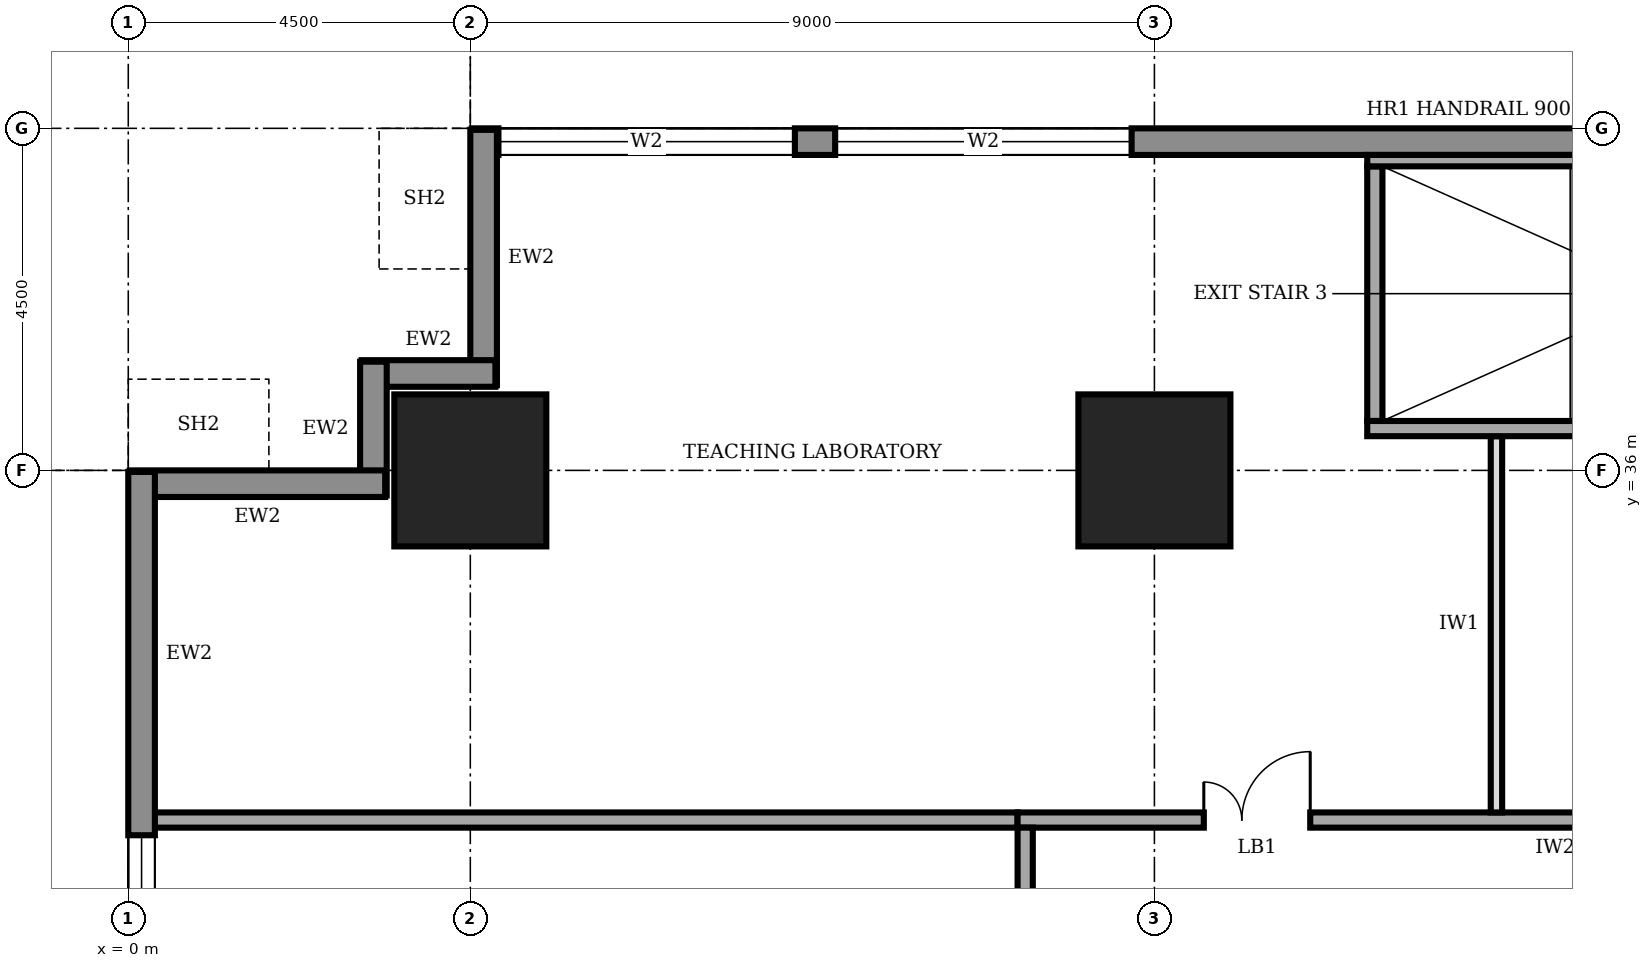
"""IFC4 building model, lengths in metres.
Left out: names, types, materials, properties, quantities, classifications, styles, units other than length and angle.
Written with IfcOpenShell. Run it as: python <this file> out.ifc"""

import sys

from ifc_helpers import new_model, si_unit, direction, frame, frame_2d, origin, origin_2d, place, context, subcontext, project, spatial, rectangle, extrude, element, fill, save


model = new_model("IFC4")
c1 = context("Model", 3, precision=1e-05, world=origin(), true_north=direction((0.0, 1.0)))
c2 = subcontext(c1, "Body", "Model", "MODEL_VIEW")
j1 = project(units=[si_unit("LENGTHUNIT", "METRE"), si_unit("PLANEANGLEUNIT", "RADIAN")], contexts=[c1])
p1 = place(None, origin())
s1 = spatial("IfcSite", under=j1, at=p1, CompositionType="ELEMENT")
p2 = place(p1, origin())
s2 = spatial("IfcBuilding", under=s1, at=p2, CompositionType="ELEMENT")
p3 = place(p2, frame((0.0, 0.0, 65.0)))
s3 = spatial("IfcBuildingStorey", under=s2, at=p3, CompositionType="ELEMENT", Elevation=65.0)
for number, where, z_axis, x_axis in (
    (1, (4.5, 36.0, 0.0), (0.0, 0.0, 1.0), (1.0, 0.0, 0.0)),
    (2, (13.5, 36.0, 0.0), (0.0, 0.0, 1.0), (1.0, 0.0, 0.0)),
):
    element("IfcColumn", number, at=place(p3, frame(where, z_axis=z_axis, x_axis=x_axis)), inside=s3, PredefinedType="COLUMN", context=c2, shape_type="SweptSolid", body=[
        extrude(rectangle(XDim=2.0, YDim=2.0, at=origin_2d()), origin(), (0.0, 0.0, 1.0), 4.0),
    ])
p4 = place(p3, frame((35.98, 40.325, 0.0), z_axis=(0.0, 0.0, 1.0), x_axis=(-1.0, 0.0, 0.0)))
e3 = element("IfcWall", 3, at=p4, inside=s3, PredefinedType="STANDARD", context=c2, shape_type="SweptSolid", body=[
    extrude(rectangle(XDim=31.46, YDim=0.35, at=frame_2d((15.73, 0.0))), origin(), (0.0, 0.0, 1.0), 3.75),
])
p5 = place(p4, frame((27.21, 0.0, 0.6)))
e4 = element("IfcOpeningElement", 4, at=p5, cuts=e3, PredefinedType="OPENING", context=c2, shape_type="SweptSolid", body=[
    extrude(rectangle(XDim=3.9, YDim=2.6, at=frame_2d((1.95, 1.3))), frame((0.0, 0.185, 0.0), z_axis=(0.0, -1.0, 0.0), x_axis=(1.0, 0.0, 0.0)), (0.0, 0.0, 1.0), 0.37),
])
p6 = place(p4, frame((22.78, 0.0, 0.6)))
e5 = element("IfcOpeningElement", 5, at=p6, cuts=e3, PredefinedType="OPENING", context=c2, shape_type="SweptSolid", body=[
    extrude(rectangle(XDim=3.9, YDim=2.6, at=frame_2d((1.95, 1.3))), frame((0.0, 0.185, 0.0), z_axis=(0.0, -1.0, 0.0), x_axis=(1.0, 0.0, 0.0)), (0.0, 0.0, 1.0), 0.37),
])
p7 = place(p4, frame((4.78, 0.0, 0.6)))
e6 = element("IfcOpeningElement", 6, at=p7, cuts=e3, PredefinedType="OPENING", context=c2, shape_type="SweptSolid", body=[
    extrude(rectangle(XDim=3.9, YDim=2.6, at=frame_2d((1.95, 1.3))), frame((0.0, 0.185, 0.0), z_axis=(0.0, -1.0, 0.0), x_axis=(1.0, 0.0, 0.0)), (0.0, 0.0, 1.0), 0.37),
])
p8 = place(p3, frame((4.675, 40.48, 0.0), z_axis=(0.0, 0.0, 1.0), x_axis=(0.0, -1.0, 0.0)))
e7 = element("IfcWall", 7, at=p8, inside=s3, PredefinedType="STANDARD", context=c2, shape_type="SweptSolid", body=[
    extrude(rectangle(XDim=3.36, YDim=0.35, at=frame_2d((1.68, 0.0))), origin(), (0.0, 0.0, 1.0), 2.85),
])
for number, where, z_axis, x_axis in (
    (8, (4.83, 37.275, 0.0), (0.0, 0.0, 1.0), (-1.0, 0.0, 0.0)),
    (9, (3.225, 37.43, 0.0), (0.0, 0.0, 1.0), (0.0, -1.0, 0.0)),
):
    element("IfcWall", number, at=place(p3, frame(where, z_axis=z_axis, x_axis=x_axis)), inside=s3, PredefinedType="STANDARD", context=c2, shape_type="SweptSolid", body=[
        extrude(rectangle(XDim=1.76, YDim=0.35, at=frame_2d((0.88, 0.0))), origin(), (0.0, 0.0, 1.0), 3.75),
    ])
p9 = place(p3, frame((3.38, 35.825, 0.0), z_axis=(0.0, 0.0, 1.0), x_axis=(-1.0, 0.0, 0.0)))
e10 = element("IfcWall", 10, at=p9, inside=s3, PredefinedType="STANDARD", context=c2, shape_type="SweptSolid", body=[
    extrude(rectangle(XDim=3.36, YDim=0.35, at=frame_2d((1.68, 0.0))), origin(), (0.0, 0.0, 1.0), 2.85),
])
p10 = place(p3, frame((0.175, 35.98, 0.0), z_axis=(0.0, 0.0, 1.0), x_axis=(0.0, -1.0, 0.0)))
e11 = element("IfcWall", 11, at=p10, inside=s3, PredefinedType="STANDARD", context=c2, shape_type="SweptSolid", body=[
    extrude(rectangle(XDim=31.46, YDim=0.35, at=frame_2d((15.73, 0.0))), origin(), (0.0, 0.0, 1.0), 3.75),
])
p11 = place(p10, frame((27.21, 0.0, 0.6)))
e12 = element("IfcOpeningElement", 12, at=p11, cuts=e11, PredefinedType="OPENING", context=c2, shape_type="SweptSolid", body=[
    extrude(rectangle(XDim=3.9, YDim=2.6, at=frame_2d((1.95, 1.3))), frame((0.0, 0.185, 0.0), z_axis=(0.0, -1.0, 0.0), x_axis=(1.0, 0.0, 0.0)), (0.0, 0.0, 1.0), 0.37),
])
p12 = place(p10, frame((22.78, 0.0, 0.6)))
e13 = element("IfcOpeningElement", 13, at=p12, cuts=e11, PredefinedType="OPENING", context=c2, shape_type="SweptSolid", body=[
    extrude(rectangle(XDim=3.9, YDim=2.6, at=frame_2d((1.95, 1.3))), frame((0.0, 0.185, 0.0), z_axis=(0.0, -1.0, 0.0), x_axis=(1.0, 0.0, 0.0)), (0.0, 0.0, 1.0), 0.37),
])
p13 = place(p10, frame((18.28, 0.0, 0.6)))
e14 = element("IfcOpeningElement", 14, at=p13, cuts=e11, PredefinedType="OPENING", context=c2, shape_type="SweptSolid", body=[
    extrude(rectangle(XDim=3.9, YDim=2.6, at=frame_2d((1.95, 1.3))), frame((0.0, 0.185, 0.0), z_axis=(0.0, -1.0, 0.0), x_axis=(1.0, 0.0, 0.0)), (0.0, 0.0, 1.0), 0.37),
])
p14 = place(p10, frame((13.78, 0.0, 0.6)))
e15 = element("IfcOpeningElement", 15, at=p14, cuts=e11, PredefinedType="OPENING", context=c2, shape_type="SweptSolid", body=[
    extrude(rectangle(XDim=3.9, YDim=2.6, at=frame_2d((1.95, 1.3))), frame((0.0, 0.185, 0.0), z_axis=(0.0, -1.0, 0.0), x_axis=(1.0, 0.0, 0.0)), (0.0, 0.0, 1.0), 0.37),
])
p15 = place(p10, frame((9.28, 0.0, 0.6)))
e16 = element("IfcOpeningElement", 16, at=p15, cuts=e11, PredefinedType="OPENING", context=c2, shape_type="SweptSolid", body=[
    extrude(rectangle(XDim=3.9, YDim=2.6, at=frame_2d((1.95, 1.3))), frame((0.0, 0.185, 0.0), z_axis=(0.0, -1.0, 0.0), x_axis=(1.0, 0.0, 0.0)), (0.0, 0.0, 1.0), 0.37),
])
p16 = place(p10, frame((4.78, 0.0, 0.6)))
e17 = element("IfcOpeningElement", 17, at=p16, cuts=e11, PredefinedType="OPENING", context=c2, shape_type="SweptSolid", body=[
    extrude(rectangle(XDim=3.9, YDim=2.6, at=frame_2d((1.95, 1.3))), frame((0.0, 0.185, 0.0), z_axis=(0.0, -1.0, 0.0), x_axis=(1.0, 0.0, 0.0)), (0.0, 0.0, 1.0), 0.37),
])
p17 = place(p3, frame((30.1, 31.4, 0.0), z_axis=(0.0, 0.0, 1.0), x_axis=(-1.0, 0.0, 0.0)))
e18 = element("IfcWall", 18, at=p17, inside=s3, PredefinedType="SOLIDWALL", context=c2, shape_type="SweptSolid", body=[
    extrude(rectangle(XDim=18.4, YDim=0.2, at=frame_2d((9.2, 0.0))), origin(), (0.0, 0.0, 1.0), 3.75),
])
p18 = place(p17, frame((14.55, 0.0, 0.0)))
e19 = element("IfcOpeningElement", 19, at=p18, cuts=e18, PredefinedType="OPENING", context=c2, shape_type="SweptSolid", body=[
    extrude(rectangle(XDim=1.4, YDim=2.1, at=frame_2d((0.7, 1.05))), frame((0.0, 0.11, 0.0), z_axis=(0.0, -1.0, 0.0), x_axis=(1.0, 0.0, 0.0)), (0.0, 0.0, 1.0), 0.22),
])
p19 = place(p17, frame((7.1, 0.0, 0.0)))
e20 = element("IfcOpeningElement", 20, at=p19, cuts=e18, PredefinedType="OPENING", context=c2, shape_type="SweptSolid", body=[
    extrude(rectangle(XDim=1.0, YDim=2.1, at=frame_2d((0.5, 1.05))), frame((0.0, 0.11, 0.0), z_axis=(0.0, -1.0, 0.0), x_axis=(1.0, 0.0, 0.0)), (0.0, 0.0, 1.0), 0.22),
])
p20 = place(p17, frame((0.55, 0.0, 0.0)))
e21 = element("IfcOpeningElement", 21, at=p20, cuts=e18, PredefinedType="OPENING", context=c2, shape_type="SweptSolid", body=[
    extrude(rectangle(XDim=1.8, YDim=2.1, at=frame_2d((0.9, 1.05))), frame((0.0, 0.11, 0.0), z_axis=(0.0, -1.0, 0.0), x_axis=(1.0, 0.0, 0.0)), (0.0, 0.0, 1.0), 0.22),
])
p21 = place(p3, frame((11.8, 31.3, 0.0), z_axis=(0.0, 0.0, 1.0), x_axis=(0.0, -1.0, 0.0)))
e22 = element("IfcWall", 22, at=p21, inside=s3, PredefinedType="SOLIDWALL", context=c2, shape_type="SweptSolid", body=[
    extrude(rectangle(XDim=22.3, YDim=0.2, at=frame_2d((11.15, 0.0))), origin(), (0.0, 0.0, 1.0), 3.75),
])
p22 = place(p21, frame((19.55, 0.0, 0.0)))
e23 = element("IfcOpeningElement", 23, at=p22, cuts=e22, PredefinedType="OPENING", context=c2, shape_type="SweptSolid", body=[
    extrude(rectangle(XDim=1.0, YDim=2.1, at=frame_2d((0.5, 1.05))), frame((0.0, 0.11, 0.0), z_axis=(0.0, -1.0, 0.0), x_axis=(1.0, 0.0, 0.0)), (0.0, 0.0, 1.0), 0.22),
])
p23 = place(p21, frame((15.45, 0.0, 0.0)))
e24 = element("IfcOpeningElement", 24, at=p23, cuts=e22, PredefinedType="OPENING", context=c2, shape_type="SweptSolid", body=[
    extrude(rectangle(XDim=0.9, YDim=2.1, at=frame_2d((0.45, 1.05))), frame((0.0, 0.11, 0.0), z_axis=(0.0, -1.0, 0.0), x_axis=(1.0, 0.0, 0.0)), (0.0, 0.0, 1.0), 0.22),
])
p24 = place(p21, frame((12.45, 0.0, 0.0)))
e25 = element("IfcOpeningElement", 25, at=p24, cuts=e22, PredefinedType="OPENING", context=c2, shape_type="SweptSolid", body=[
    extrude(rectangle(XDim=0.9, YDim=2.1, at=frame_2d((0.45, 1.05))), frame((0.0, 0.11, 0.0), z_axis=(0.0, -1.0, 0.0), x_axis=(1.0, 0.0, 0.0)), (0.0, 0.0, 1.0), 0.22),
])
p25 = place(p21, frame((7.6, 0.0, 0.0)))
e26 = element("IfcOpeningElement", 26, at=p25, cuts=e22, PredefinedType="OPENING", context=c2, shape_type="SweptSolid", body=[
    extrude(rectangle(XDim=0.9, YDim=2.1, at=frame_2d((0.45, 1.05))), frame((0.0, 0.11, 0.0), z_axis=(0.0, -1.0, 0.0), x_axis=(1.0, 0.0, 0.0)), (0.0, 0.0, 1.0), 0.22),
])
p26 = place(p21, frame((4.8, 0.0, 0.0)))
e27 = element("IfcOpeningElement", 27, at=p26, cuts=e22, PredefinedType="OPENING", context=c2, shape_type="SweptSolid", body=[
    extrude(rectangle(XDim=1.0, YDim=2.1, at=frame_2d((0.5, 1.05))), frame((0.0, 0.11, 0.0), z_axis=(0.0, -1.0, 0.0), x_axis=(1.0, 0.0, 0.0)), (0.0, 0.0, 1.0), 0.22),
])
p27 = place(p21, frame((10.3, 0.0, 0.0)))
e28 = element("IfcOpeningElement", 28, at=p27, cuts=e22, PredefinedType="OPENING", context=c2, shape_type="SweptSolid", body=[
    extrude(rectangle(XDim=1.0, YDim=2.1, at=frame_2d((0.5, 1.05))), frame((0.0, 0.11, 0.0), z_axis=(0.0, -1.0, 0.0), x_axis=(1.0, 0.0, 0.0)), (0.0, 0.0, 1.0), 0.22),
])
p28 = place(p21, frame((1.55, 0.0, 0.0)))
e29 = element("IfcOpeningElement", 29, at=p28, cuts=e22, PredefinedType="OPENING", context=c2, shape_type="SweptSolid", body=[
    extrude(rectangle(XDim=1.0, YDim=2.1, at=frame_2d((0.5, 1.05))), frame((0.0, 0.11, 0.0), z_axis=(0.0, -1.0, 0.0), x_axis=(1.0, 0.0, 0.0)), (0.0, 0.0, 1.0), 0.22),
])
p29 = place(p3, frame((0.3, 31.4, 0.0), z_axis=(0.0, 0.0, 1.0), x_axis=(1.0, 0.0, 0.0)))
e30 = element("IfcWall", 30, at=p29, inside=s3, PredefinedType="SOLIDWALL", context=c2, shape_type="SweptSolid", body=[
    extrude(rectangle(XDim=11.4, YDim=0.2, at=frame_2d((5.7, 0.0))), origin(), (0.0, 0.0, 1.0), 3.75),
])
p30 = place(p3, frame((18.0, 31.5, 0.0), z_axis=(0.0, 0.0, 1.0), x_axis=(0.0, 1.0, 0.0)))
e31 = element("IfcWall", 31, at=p30, inside=s3, PredefinedType="PARTITIONING", context=c2, shape_type="SweptSolid", body=[
    extrude(rectangle(XDim=4.95, YDim=0.15, at=frame_2d((2.475, 0.0))), origin(), (0.0, 0.0, 1.0), 3.75),
])
p31 = place(p3, frame((16.3, 36.55, 0.0), z_axis=(0.0, 0.0, 1.0), x_axis=(1.0, 0.0, 0.0)))
e32 = element("IfcWall", 32, at=p31, inside=s3, PredefinedType="SOLIDWALL", context=c2, shape_type="SweptSolid", body=[
    extrude(rectangle(XDim=7.9, YDim=0.2, at=frame_2d((3.95, 0.0))), origin(), (0.0, 0.0, 1.0), 3.75),
])
p32 = place(p31, frame((6.3, 0.0, 0.0)))
e33 = element("IfcOpeningElement", 33, at=p32, cuts=e32, PredefinedType="OPENING", context=c2, shape_type="SweptSolid", body=[
    extrude(rectangle(XDim=1.0, YDim=2.1, at=frame_2d((0.5, 1.05))), frame((0.0, 0.11, 0.0), z_axis=(0.0, -1.0, 0.0), x_axis=(1.0, 0.0, 0.0)), (0.0, 0.0, 1.0), 0.22),
])
p33 = place(p3, frame((16.3, 40.075, 0.0), z_axis=(0.0, 0.0, 1.0), x_axis=(1.0, 0.0, 0.0)))
e34 = element("IfcWall", 34, at=p33, inside=s3, PredefinedType="SOLIDWALL", context=c2, shape_type="SweptSolid", body=[
    extrude(rectangle(XDim=7.9, YDim=0.15, at=frame_2d((3.95, 0.0))), origin(), (0.0, 0.0, 1.0), 3.75),
])
p34 = place(p3, frame((16.4, 36.65, 0.0), z_axis=(0.0, 0.0, 1.0), x_axis=(0.0, 1.0, 0.0)))
e35 = element("IfcWall", 35, at=p34, inside=s3, PredefinedType="SOLIDWALL", context=c2, shape_type="SweptSolid", body=[
    extrude(rectangle(XDim=3.35, YDim=0.2, at=frame_2d((1.675, 0.0))), origin(), (0.0, 0.0, 1.0), 3.75),
])
p35 = place(p5, origin())
e36 = element("IfcWindow", 36, at=p35, inside=s3, PartitioningType="SINGLE_PANEL", PredefinedType="WINDOW", context=c2, shape_type="SweptSolid", body=[
    extrude(rectangle(XDim=3.9, YDim=2.6, at=frame_2d((1.95, 1.3))), frame((0.0, 0.03, 0.0), z_axis=(0.0, -1.0, 0.0), x_axis=(1.0, 0.0, 0.0)), (0.0, 0.0, 1.0), 0.06),
])
fill(e4, e36)
p36 = place(p6, origin())
e37 = element("IfcWindow", 37, at=p36, inside=s3, PartitioningType="SINGLE_PANEL", PredefinedType="WINDOW", context=c2, shape_type="SweptSolid", body=[
    extrude(rectangle(XDim=3.9, YDim=2.6, at=frame_2d((1.95, 1.3))), frame((0.0, 0.03, 0.0), z_axis=(0.0, -1.0, 0.0), x_axis=(1.0, 0.0, 0.0)), (0.0, 0.0, 1.0), 0.06),
])
fill(e5, e37)
p37 = place(p16, origin())
e38 = element("IfcWindow", 38, at=p37, inside=s3, PartitioningType="SINGLE_PANEL", PredefinedType="WINDOW", context=c2, shape_type="SweptSolid", body=[
    extrude(rectangle(XDim=3.9, YDim=2.6, at=frame_2d((1.95, 1.3))), frame((0.0, 0.03, 0.0), z_axis=(0.0, -1.0, 0.0), x_axis=(1.0, 0.0, 0.0)), (0.0, 0.0, 1.0), 0.06),
])
fill(e17, e38)
p38 = place(p18, frame((1.4, 0.0, 0.0), z_axis=(0.0, 0.0, 1.0), x_axis=(-1.0, 0.0, 0.0)))
e39 = element("IfcDoor", 39, at=p38, inside=s3, OperationType="DOUBLE_DOOR_SINGLE_SWING", PredefinedType="DOOR", context=c2, shape_type="SweptSolid", body=[
    extrude(rectangle(XDim=1.4, YDim=2.1, at=frame_2d((0.7, 1.05))), frame((0.0, 0.025, 0.0), z_axis=(0.0, -1.0, 0.0), x_axis=(1.0, 0.0, 0.0)), (0.0, 0.0, 1.0), 0.05),
])
fill(e19, e39)
save(model, sys.argv[1])
